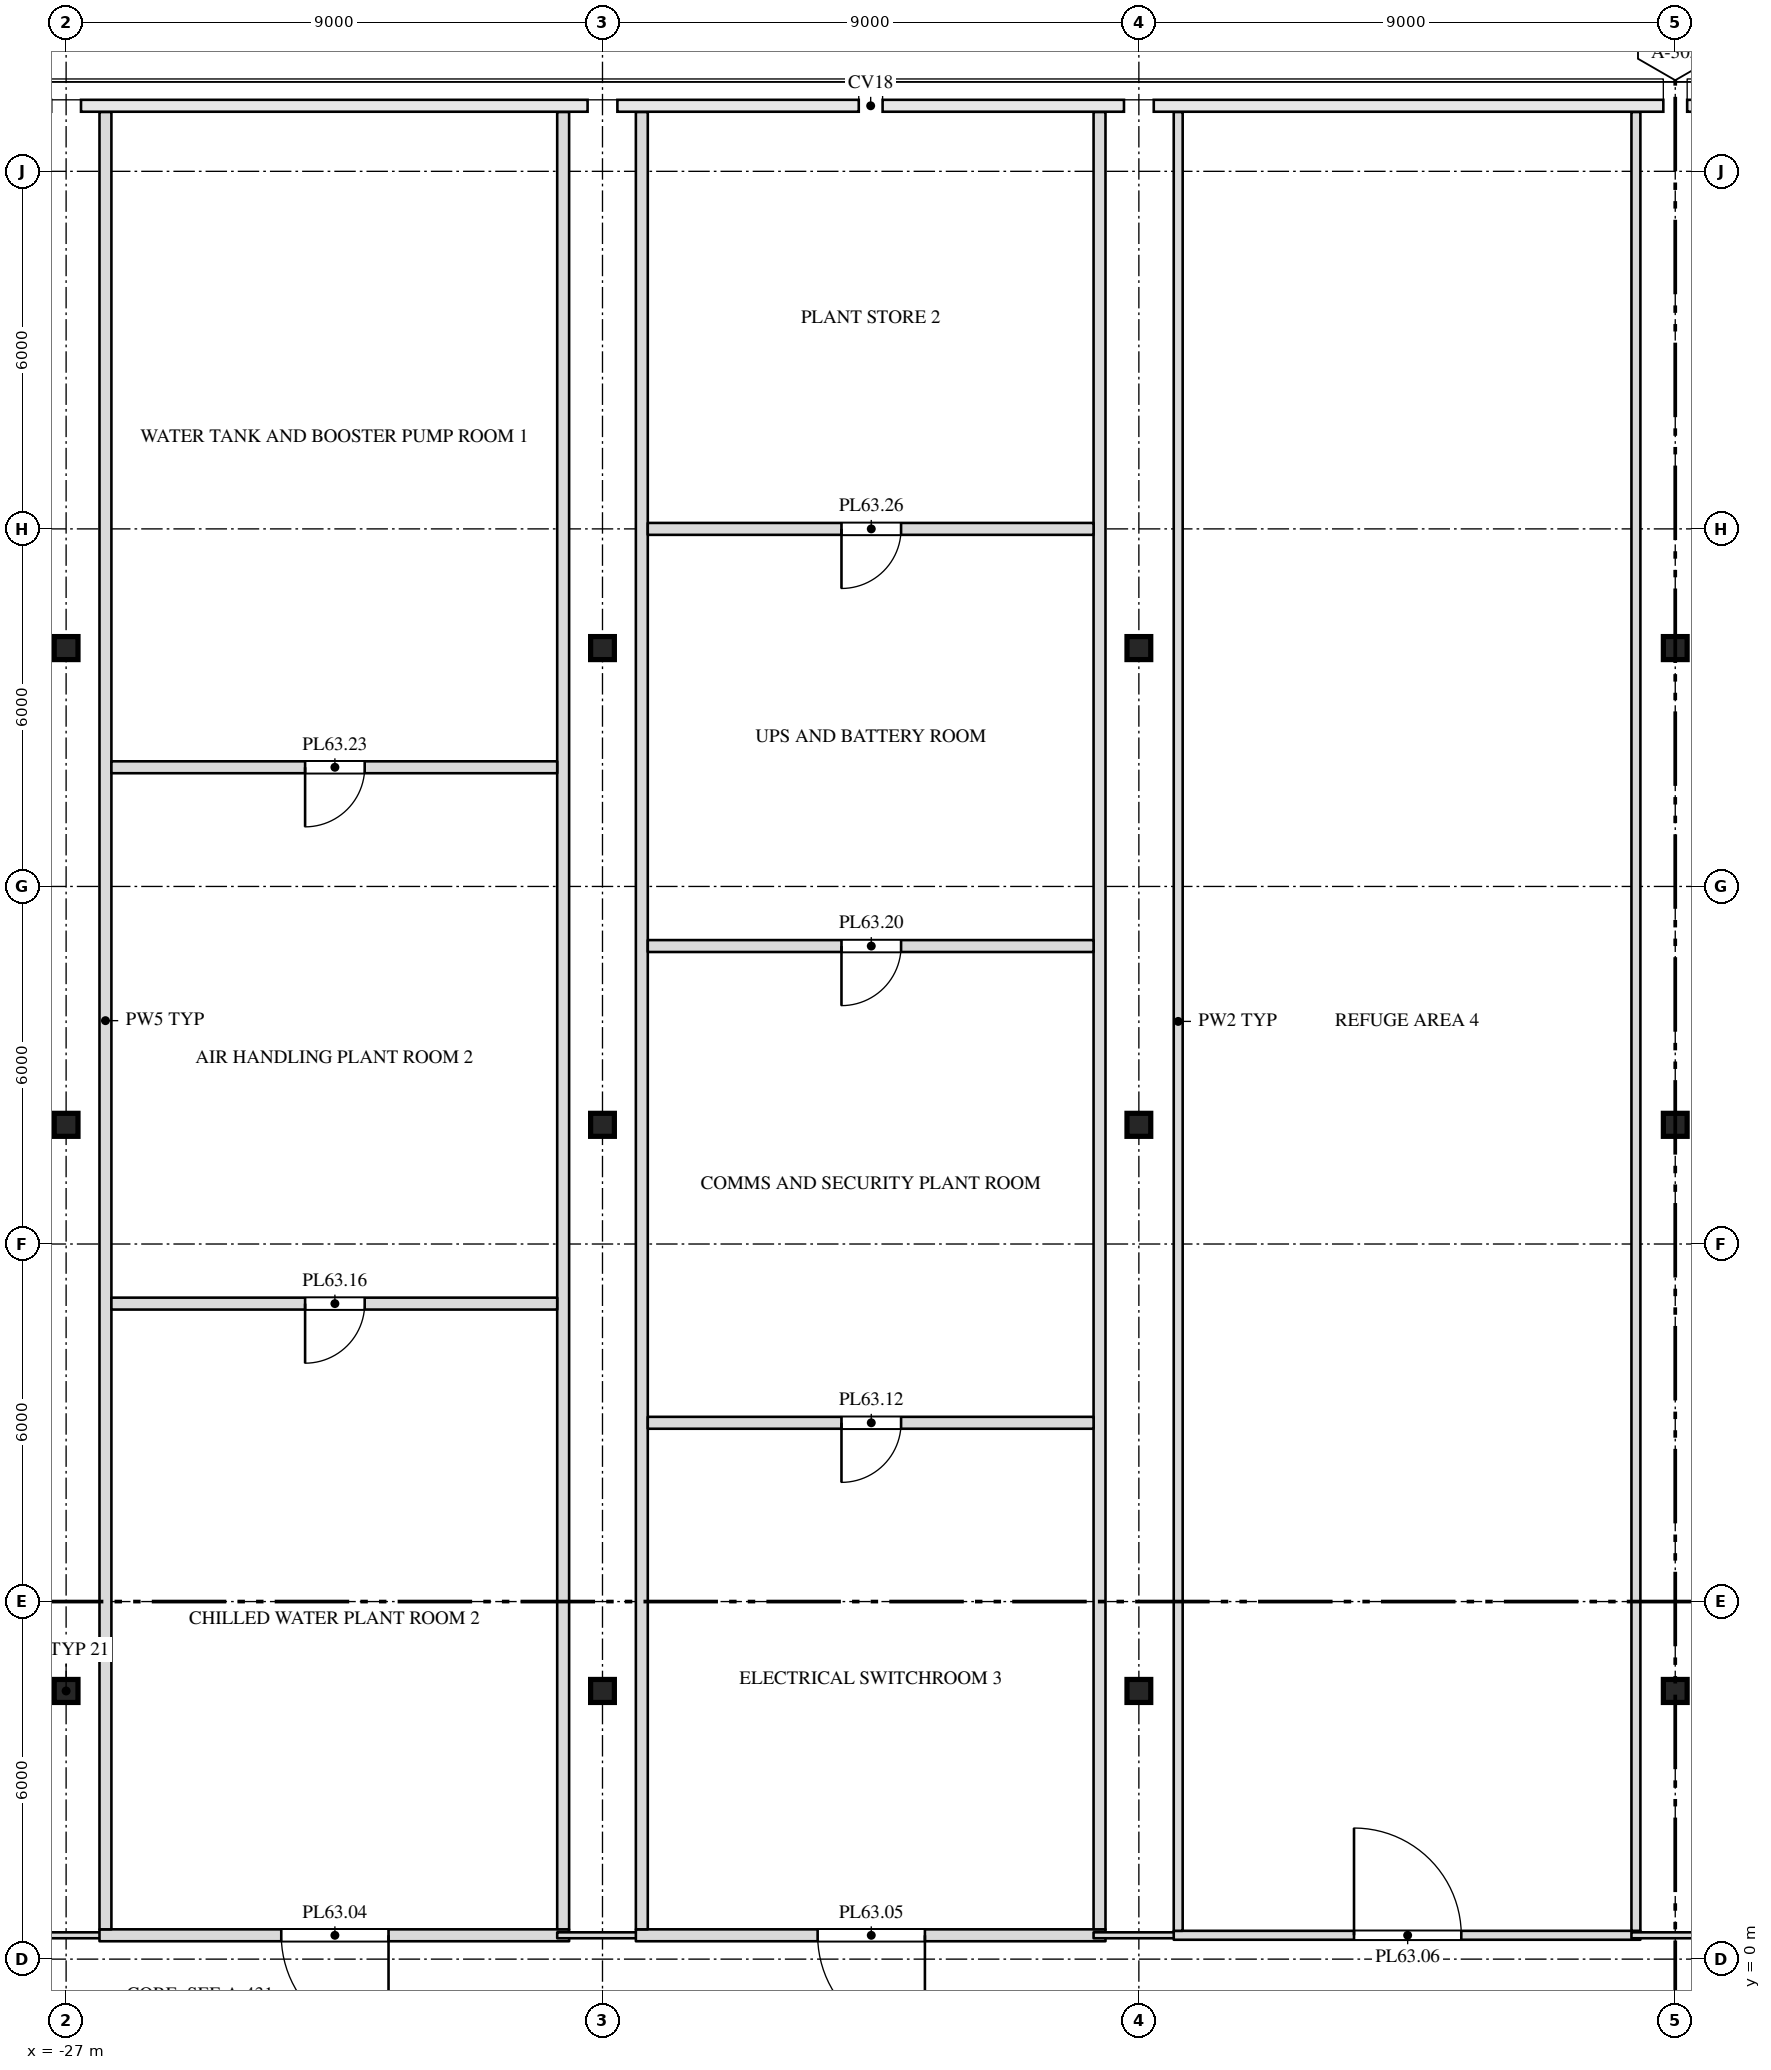
"""IFC4 building model, lengths in metres.
Left out: names, types, materials, properties, quantities, classifications, styles, units other than length and angle.
Written with IfcOpenShell. Run it as: python <this file> out.ifc"""

import sys

from ifc_helpers import new_model, si_unit, direction, frame, frame_2d, origin, origin_2d, place, context, subcontext, project, spatial, rectangle, i_section, extrude, element, fill, save


model = new_model("IFC4")
c1 = context("Model", 3, precision=1e-05, world=origin(), true_north=direction((0.0, 1.0)))
c2 = subcontext(c1, "Body", "Model", "MODEL_VIEW")
j1 = project(units=[si_unit("LENGTHUNIT", "METRE"), si_unit("PLANEANGLEUNIT", "RADIAN")], contexts=[c1])
p1 = place(None, origin())
s1 = spatial("IfcSite", under=j1, at=p1, CompositionType="ELEMENT")
p2 = place(p1, origin())
s2 = spatial("IfcBuilding", under=s1, at=p2, CompositionType="ELEMENT")
p3 = place(p2, frame((0.0, 0.0, 268.5)))
s3 = spatial("IfcBuildingStorey", under=s2, at=p3, CompositionType="ELEMENT", Elevation=268.5)
for number, where, z_axis, x_axis in (
    (1, (-27.0, 4.5, 0.0), (0.0, 0.0, 1.0), (1.0, 0.0, 0.0)),
    (2, (-18.0, 4.5, 0.0), (0.0, 0.0, 1.0), (1.0, 0.0, 0.0)),
    (3, (-9.0, 4.5, 0.0), (0.0, 0.0, 1.0), (1.0, 0.0, 0.0)),
    (4, (0.0, 4.5, 0.0), (0.0, 0.0, 1.0), (1.0, 0.0, 0.0)),
    (5, (-27.0, 14.0, 0.0), (0.0, 0.0, 1.0), (1.0, 0.0, 0.0)),
    (6, (-18.0, 14.0, 0.0), (0.0, 0.0, 1.0), (1.0, 0.0, 0.0)),
    (7, (-9.0, 14.0, 0.0), (0.0, 0.0, 1.0), (1.0, 0.0, 0.0)),
    (8, (0.0, 14.0, 0.0), (0.0, 0.0, 1.0), (1.0, 0.0, 0.0)),
    (9, (-27.0, 22.0, 0.0), (0.0, 0.0, 1.0), (1.0, 0.0, 0.0)),
    (10, (-18.0, 22.0, 0.0), (0.0, 0.0, 1.0), (1.0, 0.0, 0.0)),
    (11, (-9.0, 22.0, 0.0), (0.0, 0.0, 1.0), (1.0, 0.0, 0.0)),
    (12, (0.0, 22.0, 0.0), (0.0, 0.0, 1.0), (1.0, 0.0, 0.0)),
):
    element("IfcColumn", number, at=place(p3, frame(where, z_axis=z_axis, x_axis=x_axis)), inside=s3, PredefinedType="COLUMN", context=c2, shape_type="SweptSolid", body=[
        extrude(i_section(OverallWidth=0.399, OverallDepth=0.386, WebThickness=0.021, FlangeThickness=0.033, at=origin_2d()), origin(), (0.0, 0.0, 1.0), 4.0),
    ])
p4 = place(p3, frame((-27.675, 0.4, 0.0), z_axis=(0.0, 0.0, 1.0), x_axis=(1.0, 0.0, 0.0)))
e13 = element("IfcWall", 13, at=p4, inside=s3, PredefinedType="PARTITIONING", context=c2, shape_type="SweptSolid", body=[
    extrude(rectangle(XDim=1.435, YDim=0.1, at=frame_2d((0.718, 0.0))), origin(), (0.0, 0.0, 1.0), 3.78),
])
p5 = place(p3, frame((-26.44, 0.4, 0.0), z_axis=(0.0, 0.0, 1.0), x_axis=(1.0, 0.0, 0.0)))
e14 = element("IfcWall", 14, at=p5, inside=s3, PredefinedType="PARTITIONING", context=c2, shape_type="SweptSolid", body=[
    extrude(rectangle(XDim=7.88, YDim=0.2, at=frame_2d((3.94, 0.0))), origin(), (0.0, 0.0, 1.0), 3.78),
])
p6 = place(p5, frame((3.05, 0.0, 0.0)))
e15 = element("IfcOpeningElement", 15, at=p6, cuts=e14, PredefinedType="OPENING", context=c2, shape_type="SweptSolid", body=[
    extrude(rectangle(XDim=1.8, YDim=2.1, at=frame_2d((0.9, 1.05))), frame((0.0, 0.112, 0.0), z_axis=(0.0, -1.0, 0.0), x_axis=(1.0, 0.0, 0.0)), (0.0, 0.0, 1.0), 0.224),
])
p7 = place(p3, frame((-26.34, 0.5, 0.0), z_axis=(0.0, 0.0, 1.0), x_axis=(0.0, 1.0, 0.0)))
e16 = element("IfcWall", 16, at=p7, inside=s3, PredefinedType="PARTITIONING", context=c2, shape_type="SweptSolid", body=[
    extrude(rectangle(XDim=30.496, YDim=0.2, at=frame_2d((15.248, 0.0))), origin(), (0.0, 0.0, 1.0), 3.78),
])
p8 = place(p3, frame((-18.76, 0.4, 0.0), z_axis=(0.0, 0.0, 1.0), x_axis=(1.0, 0.0, 0.0)))
e17 = element("IfcWall", 17, at=p8, inside=s3, PredefinedType="PARTITIONING", context=c2, shape_type="SweptSolid", body=[
    extrude(rectangle(XDim=1.52, YDim=0.1, at=frame_2d((0.76, 0.0))), origin(), (0.0, 0.0, 1.0), 3.78),
])
p9 = place(p3, frame((-18.66, 0.5, 0.0), z_axis=(0.0, 0.0, 1.0), x_axis=(0.0, 1.0, 0.0)))
e18 = element("IfcWall", 18, at=p9, inside=s3, PredefinedType="PARTITIONING", context=c2, shape_type="SweptSolid", body=[
    extrude(rectangle(XDim=30.496, YDim=0.2, at=frame_2d((15.248, 0.0))), origin(), (0.0, 0.0, 1.0), 3.78),
])
p10 = place(p3, frame((-17.44, 0.4, 0.0), z_axis=(0.0, 0.0, 1.0), x_axis=(1.0, 0.0, 0.0)))
e19 = element("IfcWall", 19, at=p10, inside=s3, PredefinedType="PARTITIONING", context=c2, shape_type="SweptSolid", body=[
    extrude(rectangle(XDim=7.88, YDim=0.2, at=frame_2d((3.94, 0.0))), origin(), (0.0, 0.0, 1.0), 3.78),
])
p11 = place(p10, frame((3.05, 0.0, 0.0)))
e20 = element("IfcOpeningElement", 20, at=p11, cuts=e19, PredefinedType="OPENING", context=c2, shape_type="SweptSolid", body=[
    extrude(rectangle(XDim=1.8, YDim=2.1, at=frame_2d((0.9, 1.05))), frame((0.0, 0.112, 0.0), z_axis=(0.0, -1.0, 0.0), x_axis=(1.0, 0.0, 0.0)), (0.0, 0.0, 1.0), 0.224),
])
p12 = place(p3, frame((-17.34, 0.5, 0.0), z_axis=(0.0, 0.0, 1.0), x_axis=(0.0, 1.0, 0.0)))
e21 = element("IfcWall", 21, at=p12, inside=s3, PredefinedType="PARTITIONING", context=c2, shape_type="SweptSolid", body=[
    extrude(rectangle(XDim=30.496, YDim=0.2, at=frame_2d((15.248, 0.0))), origin(), (0.0, 0.0, 1.0), 3.78),
])
p13 = place(p3, frame((-9.76, 0.4, 0.0), z_axis=(0.0, 0.0, 1.0), x_axis=(1.0, 0.0, 0.0)))
e22 = element("IfcWall", 22, at=p13, inside=s3, PredefinedType="PARTITIONING", context=c2, shape_type="SweptSolid", body=[
    extrude(rectangle(XDim=1.495, YDim=0.1, at=frame_2d((0.748, 0.0))), origin(), (0.0, 0.0, 1.0), 3.78),
])
p14 = place(p3, frame((-9.66, 0.5, 0.0), z_axis=(0.0, 0.0, 1.0), x_axis=(0.0, 1.0, 0.0)))
e23 = element("IfcWall", 23, at=p14, inside=s3, PredefinedType="PARTITIONING", context=c2, shape_type="SweptSolid", body=[
    extrude(rectangle(XDim=30.496, YDim=0.2, at=frame_2d((15.248, 0.0))), origin(), (0.0, 0.0, 1.0), 3.78),
])
p15 = place(p3, frame((-8.415, 0.4, 0.0), z_axis=(0.0, 0.0, 1.0), x_axis=(1.0, 0.0, 0.0)))
e24 = element("IfcWall", 24, at=p15, inside=s3, PredefinedType="PARTITIONING", context=c2, shape_type="SweptSolid", body=[
    extrude(rectangle(XDim=7.83, YDim=0.15, at=frame_2d((3.915, 0.0))), origin(), (0.0, 0.0, 1.0), 3.78),
])
p16 = place(p15, frame((3.025, 0.0, 0.0)))
e25 = element("IfcOpeningElement", 25, at=p16, cuts=e24, PredefinedType="OPENING", context=c2, shape_type="SweptSolid", body=[
    extrude(rectangle(XDim=1.8, YDim=2.1, at=frame_2d((0.9, 1.05))), frame((0.0, 0.087, 0.0), z_axis=(0.0, -1.0, 0.0), x_axis=(1.0, 0.0, 0.0)), (0.0, 0.0, 1.0), 0.174),
])
p17 = place(p3, frame((-8.34, 0.475, 0.0), z_axis=(0.0, 0.0, 1.0), x_axis=(0.0, 1.0, 0.0)))
e26 = element("IfcWall", 26, at=p17, inside=s3, PredefinedType="PARTITIONING", context=c2, shape_type="SweptSolid", body=[
    extrude(rectangle(XDim=30.521, YDim=0.15, at=frame_2d((15.26, 0.0))), origin(), (0.0, 0.0, 1.0), 3.78),
])
p18 = place(p3, frame((-0.735, 0.4, 0.0), z_axis=(0.0, 0.0, 1.0), x_axis=(1.0, 0.0, 0.0)))
e27 = element("IfcWall", 27, at=p18, inside=s3, PredefinedType="PARTITIONING", context=c2, shape_type="SweptSolid", body=[
    extrude(rectangle(XDim=1.495, YDim=0.1, at=frame_2d((0.748, 0.0))), origin(), (0.0, 0.0, 1.0), 3.78),
])
p19 = place(p3, frame((-0.66, 0.475, 0.0), z_axis=(0.0, 0.0, 1.0), x_axis=(0.0, 1.0, 0.0)))
e28 = element("IfcWall", 28, at=p19, inside=s3, PredefinedType="PARTITIONING", context=c2, shape_type="SweptSolid", body=[
    extrude(rectangle(XDim=30.521, YDim=0.15, at=frame_2d((15.26, 0.0))), origin(), (0.0, 0.0, 1.0), 3.78),
])
p20 = place(p3, frame((-17.24, 9.0, 0.0), z_axis=(0.0, 0.0, 1.0), x_axis=(1.0, 0.0, 0.0)))
e29 = element("IfcWall", 29, at=p20, inside=s3, PredefinedType="PARTITIONING", context=c2, shape_type="SweptSolid", body=[
    extrude(rectangle(XDim=7.48, YDim=0.2, at=frame_2d((3.74, 0.0))), origin(), (0.0, 0.0, 1.0), 3.78),
])
p21 = place(p20, frame((3.25, 0.0, 0.0)))
e30 = element("IfcOpeningElement", 30, at=p21, cuts=e29, PredefinedType="OPENING", context=c2, shape_type="SweptSolid", body=[
    extrude(rectangle(XDim=1.0, YDim=2.1, at=frame_2d((0.5, 1.05))), frame((0.0, 0.112, 0.0), z_axis=(0.0, -1.0, 0.0), x_axis=(1.0, 0.0, 0.0)), (0.0, 0.0, 1.0), 0.224),
])
p22 = place(p3, frame((-26.24, 11.0, 0.0), z_axis=(0.0, 0.0, 1.0), x_axis=(1.0, 0.0, 0.0)))
e31 = element("IfcWall", 31, at=p22, inside=s3, PredefinedType="PARTITIONING", context=c2, shape_type="SweptSolid", body=[
    extrude(rectangle(XDim=7.48, YDim=0.2, at=frame_2d((3.74, 0.0))), origin(), (0.0, 0.0, 1.0), 3.78),
])
p23 = place(p22, frame((3.25, 0.0, 0.0)))
e32 = element("IfcOpeningElement", 32, at=p23, cuts=e31, PredefinedType="OPENING", context=c2, shape_type="SweptSolid", body=[
    extrude(rectangle(XDim=1.0, YDim=2.1, at=frame_2d((0.5, 1.05))), frame((0.0, 0.112, 0.0), z_axis=(0.0, -1.0, 0.0), x_axis=(1.0, 0.0, 0.0)), (0.0, 0.0, 1.0), 0.224),
])
p24 = place(p3, frame((-17.24, 17.0, 0.0), z_axis=(0.0, 0.0, 1.0), x_axis=(1.0, 0.0, 0.0)))
e33 = element("IfcWall", 33, at=p24, inside=s3, PredefinedType="PARTITIONING", context=c2, shape_type="SweptSolid", body=[
    extrude(rectangle(XDim=7.48, YDim=0.2, at=frame_2d((3.74, 0.0))), origin(), (0.0, 0.0, 1.0), 3.78),
])
p25 = place(p24, frame((3.25, 0.0, 0.0)))
e34 = element("IfcOpeningElement", 34, at=p25, cuts=e33, PredefinedType="OPENING", context=c2, shape_type="SweptSolid", body=[
    extrude(rectangle(XDim=1.0, YDim=2.1, at=frame_2d((0.5, 1.05))), frame((0.0, 0.112, 0.0), z_axis=(0.0, -1.0, 0.0), x_axis=(1.0, 0.0, 0.0)), (0.0, 0.0, 1.0), 0.224),
])
p26 = place(p3, frame((-26.24, 20.0, 0.0), z_axis=(0.0, 0.0, 1.0), x_axis=(1.0, 0.0, 0.0)))
e35 = element("IfcWall", 35, at=p26, inside=s3, PredefinedType="PARTITIONING", context=c2, shape_type="SweptSolid", body=[
    extrude(rectangle(XDim=7.48, YDim=0.2, at=frame_2d((3.74, 0.0))), origin(), (0.0, 0.0, 1.0), 3.78),
])
p27 = place(p26, frame((3.25, 0.0, 0.0)))
e36 = element("IfcOpeningElement", 36, at=p27, cuts=e35, PredefinedType="OPENING", context=c2, shape_type="SweptSolid", body=[
    extrude(rectangle(XDim=1.0, YDim=2.1, at=frame_2d((0.5, 1.05))), frame((0.0, 0.112, 0.0), z_axis=(0.0, -1.0, 0.0), x_axis=(1.0, 0.0, 0.0)), (0.0, 0.0, 1.0), 0.224),
])
p28 = place(p3, frame((-17.24, 24.0, 0.0), z_axis=(0.0, 0.0, 1.0), x_axis=(1.0, 0.0, 0.0)))
e37 = element("IfcWall", 37, at=p28, inside=s3, PredefinedType="PARTITIONING", context=c2, shape_type="SweptSolid", body=[
    extrude(rectangle(XDim=7.48, YDim=0.2, at=frame_2d((3.74, 0.0))), origin(), (0.0, 0.0, 1.0), 3.78),
])
p29 = place(p28, frame((3.25, 0.0, 0.0)))
e38 = element("IfcOpeningElement", 38, at=p29, cuts=e37, PredefinedType="OPENING", context=c2, shape_type="SweptSolid", body=[
    extrude(rectangle(XDim=1.0, YDim=2.1, at=frame_2d((0.5, 1.05))), frame((0.0, 0.112, 0.0), z_axis=(0.0, -1.0, 0.0), x_axis=(1.0, 0.0, 0.0)), (0.0, 0.0, 1.0), 0.224),
])
p30 = place(p6, origin())
e39 = element("IfcDoor", 39, at=p30, inside=s3, OperationType="DOUBLE_DOOR_SINGLE_SWING", PredefinedType="DOOR", context=c2, shape_type="SweptSolid", body=[
    extrude(rectangle(XDim=1.8, YDim=2.1, at=frame_2d((0.9, 1.05))), frame((0.0, 0.025, 0.0), z_axis=(0.0, -1.0, 0.0), x_axis=(1.0, 0.0, 0.0)), (0.0, 0.0, 1.0), 0.05),
])
fill(e15, e39)
p31 = place(p11, origin())
e40 = element("IfcDoor", 40, at=p31, inside=s3, OperationType="DOUBLE_DOOR_SINGLE_SWING", PredefinedType="DOOR", context=c2, shape_type="SweptSolid", body=[
    extrude(rectangle(XDim=1.8, YDim=2.1, at=frame_2d((0.9, 1.05))), frame((0.0, 0.025, 0.0), z_axis=(0.0, -1.0, 0.0), x_axis=(1.0, 0.0, 0.0)), (0.0, 0.0, 1.0), 0.05),
])
fill(e20, e40)
p32 = place(p16, origin())
e41 = element("IfcDoor", 41, at=p32, inside=s3, OperationType="DOUBLE_DOOR_SINGLE_SWING", PredefinedType="DOOR", context=c2, shape_type="SweptSolid", body=[
    extrude(rectangle(XDim=1.8, YDim=2.1, at=frame_2d((0.9, 1.05))), frame((0.0, 0.025, 0.0), z_axis=(0.0, -1.0, 0.0), x_axis=(1.0, 0.0, 0.0)), (0.0, 0.0, 1.0), 0.05),
])
fill(e25, e41)
p33 = place(p21, origin())
e42 = element("IfcDoor", 42, at=p33, inside=s3, OperationType="SINGLE_SWING_RIGHT", PredefinedType="DOOR", context=c2, shape_type="SweptSolid", body=[
    extrude(rectangle(XDim=1.0, YDim=2.1, at=frame_2d((0.5, 1.05))), frame((0.0, 0.025, 0.0), z_axis=(0.0, -1.0, 0.0), x_axis=(1.0, 0.0, 0.0)), (0.0, 0.0, 1.0), 0.05),
])
fill(e30, e42)
p34 = place(p23, origin())
e43 = element("IfcDoor", 43, at=p34, inside=s3, OperationType="SINGLE_SWING_RIGHT", PredefinedType="DOOR", context=c2, shape_type="SweptSolid", body=[
    extrude(rectangle(XDim=1.0, YDim=2.1, at=frame_2d((0.5, 1.05))), frame((0.0, 0.025, 0.0), z_axis=(0.0, -1.0, 0.0), x_axis=(1.0, 0.0, 0.0)), (0.0, 0.0, 1.0), 0.05),
])
fill(e32, e43)
p35 = place(p25, origin())
e44 = element("IfcDoor", 44, at=p35, inside=s3, OperationType="SINGLE_SWING_RIGHT", PredefinedType="DOOR", context=c2, shape_type="SweptSolid", body=[
    extrude(rectangle(XDim=1.0, YDim=2.1, at=frame_2d((0.5, 1.05))), frame((0.0, 0.025, 0.0), z_axis=(0.0, -1.0, 0.0), x_axis=(1.0, 0.0, 0.0)), (0.0, 0.0, 1.0), 0.05),
])
fill(e34, e44)
p36 = place(p27, origin())
e45 = element("IfcDoor", 45, at=p36, inside=s3, OperationType="SINGLE_SWING_RIGHT", PredefinedType="DOOR", context=c2, shape_type="SweptSolid", body=[
    extrude(rectangle(XDim=1.0, YDim=2.1, at=frame_2d((0.5, 1.05))), frame((0.0, 0.025, 0.0), z_axis=(0.0, -1.0, 0.0), x_axis=(1.0, 0.0, 0.0)), (0.0, 0.0, 1.0), 0.05),
])
fill(e36, e45)
p37 = place(p29, origin())
e46 = element("IfcDoor", 46, at=p37, inside=s3, OperationType="SINGLE_SWING_RIGHT", PredefinedType="DOOR", context=c2, shape_type="SweptSolid", body=[
    extrude(rectangle(XDim=1.0, YDim=2.1, at=frame_2d((0.5, 1.05))), frame((0.0, 0.025, 0.0), z_axis=(0.0, -1.0, 0.0), x_axis=(1.0, 0.0, 0.0)), (0.0, 0.0, 1.0), 0.05),
])
fill(e38, e46)
save(model, sys.argv[1])
